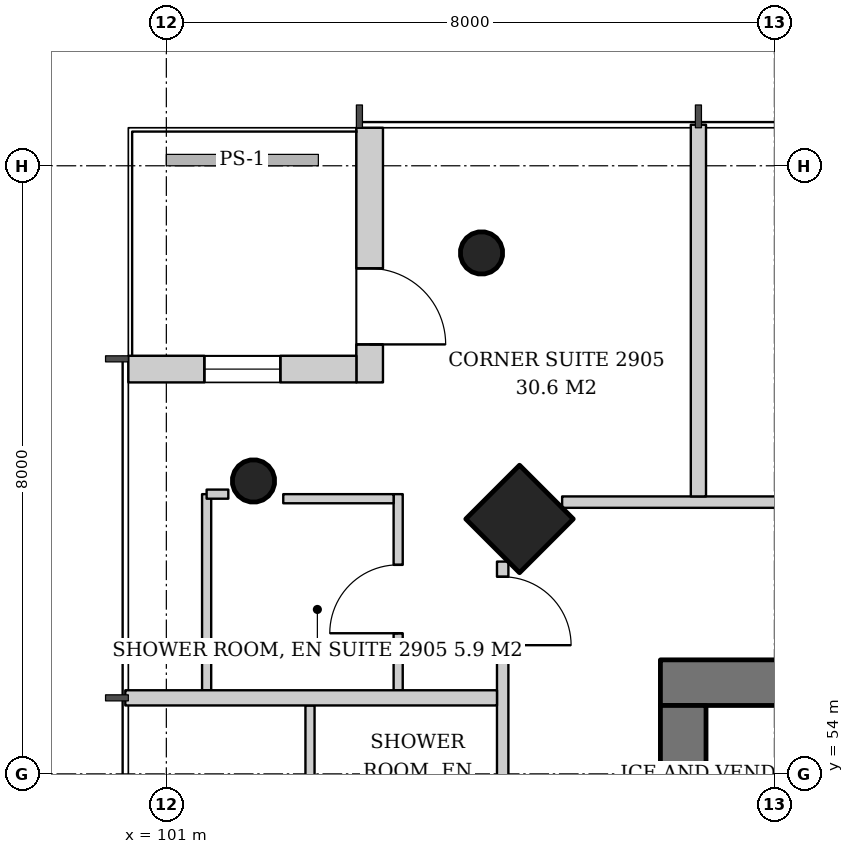
"""IFC4 building model, lengths in metres.
Left out: names, types, materials, properties, quantities, classifications, styles, units other than length and angle.
Written with IfcOpenShell. Run it as: python <this file> out.ifc"""

import sys

from ifc_helpers import new_model, si_unit, direction, frame, frame_2d, origin, origin_2d, place, context, subcontext, project, spatial, rectangle, hollow_circle, extrude, element, fill, save


model = new_model("IFC4")
c1 = context("Model", 3, precision=1e-05, world=origin(), true_north=direction((0.0, 1.0)))
c2 = subcontext(c1, "Body", "Model", "MODEL_VIEW")
j1 = project(units=[si_unit("LENGTHUNIT", "METRE"), si_unit("PLANEANGLEUNIT", "RADIAN")], contexts=[c1])
p1 = place(None, origin())
s1 = spatial("IfcSite", under=j1, at=p1, CompositionType="ELEMENT")
p2 = place(p1, origin())
s2 = spatial("IfcBuilding", under=s1, at=p2, CompositionType="ELEMENT")
p3 = place(p2, frame((0.0, 0.0, 116.0)))
s3 = spatial("IfcBuildingStorey", under=s2, at=p3, CompositionType="ELEMENT", Elevation=116.0)
p4 = place(p3, frame((105.595, 57.405, 0.0), z_axis=(0.043029647111, -0.043029647111, 0.998146732169), x_axis=(0.707106781187, 0.707106781187, 0.0)))
e1 = element("IfcColumn", 1, at=p4, inside=s3, PredefinedType="COLUMN", context=c2, shape_type="SweptSolid", body=[
    extrude(rectangle(XDim=1.0, YDim=1.0, at=origin_2d()), origin(), (0.0, 0.0, 1.0), 3.807),
])
for number, where, z_axis, x_axis in (
    (2, (105.095, 60.905, 0.0), (0.043, -0.043, 0.998), (0.707, 0.707, 0.0)),
    (3, (102.095, 57.905, 0.0), (0.043, -0.043, 0.998), (0.707, 0.707, 0.0)),
):
    element("IfcColumn", number, at=place(p3, frame(where, z_axis=z_axis, x_axis=x_axis)), inside=s3, PredefinedType="COLUMN", context=c2, shape_type="SweptSolid", body=[
        extrude(hollow_circle(Radius=0.28, WallThickness=0.02, at=origin_2d()), origin(), (0.0, 0.0, 1.0), 3.807),
    ])
p5 = place(p3, frame((107.5, 55.2, 0.0), z_axis=(0.0, 0.0, 1.0), x_axis=(1.0, 0.0, 0.0)))
e4 = element("IfcWall", 4, at=p5, inside=s3, PredefinedType="SHEAR", context=c2, shape_type="SweptSolid", body=[
    extrude(rectangle(XDim=19.0, YDim=0.6, at=frame_2d((9.5, 0.0))), origin(), (0.0, 0.0, 1.0), 3.8),
])
p6 = place(p5, frame((14.14, 0.0, 0.0)))
e5 = element("IfcOpeningElement", 5, at=p6, cuts=e4, PredefinedType="OPENING", context=c2, shape_type="SweptSolid", body=[
    extrude(rectangle(XDim=1.0, YDim=2.1, at=frame_2d((0.5, 1.05))), frame((0.0, 0.31, 0.0), z_axis=(0.0, -1.0, 0.0), x_axis=(1.0, 0.0, 0.0)), (0.0, 0.0, 1.0), 0.62),
])
p7 = place(p5, frame((1.675, 0.0, 0.0)))
e6 = element("IfcOpeningElement", 6, at=p7, cuts=e4, PredefinedType="OPENING", context=c2, shape_type="SweptSolid", body=[
    extrude(rectangle(XDim=1.0, YDim=2.1, at=frame_2d((0.5, 1.05))), frame((0.0, 0.31, 0.0), z_axis=(0.0, -1.0, 0.0), x_axis=(1.0, 0.0, 0.0)), (0.0, 0.0, 1.0), 0.62),
])
p8 = place(p5, frame((3.587, 0.0, 0.0)))
e7 = element("IfcOpeningElement", 7, at=p8, cuts=e4, PredefinedType="OPENING", context=c2, shape_type="SweptSolid", body=[
    extrude(rectangle(XDim=1.0, YDim=2.1, at=frame_2d((0.5, 1.05))), frame((0.0, 0.31, 0.0), z_axis=(0.0, -1.0, 0.0), x_axis=(1.0, 0.0, 0.0)), (0.0, 0.0, 1.0), 0.62),
])
p9 = place(p3, frame((107.8, 37.1, 0.0), z_axis=(0.0, 0.0, 1.0), x_axis=(0.0, 1.0, 0.0)))
e8 = element("IfcWall", 8, at=p9, inside=s3, PredefinedType="SHEAR", context=c2, shape_type="SweptSolid", body=[
    extrude(rectangle(XDim=17.8, YDim=0.6, at=frame_2d((8.9, 0.0))), origin(), (0.0, 0.0, 1.0), 3.8),
])
p10 = place(p9, frame((8.0, 0.0, 0.0)))
e9 = element("IfcOpeningElement", 9, at=p10, cuts=e8, PredefinedType="OPENING", context=c2, shape_type="SweptSolid", body=[
    extrude(rectangle(XDim=1.8, YDim=2.4, at=frame_2d((0.9, 1.2))), frame((0.0, 0.31, 0.0), z_axis=(0.0, -1.0, 0.0), x_axis=(1.0, 0.0, 0.0)), (0.0, 0.0, 1.0), 0.62),
])
p11 = place(p3, frame((103.675, 62.5, 0.0), z_axis=(0.0, 0.0, 1.0), x_axis=(0.0, -1.0, 0.0)))
e10 = element("IfcWall", 10, at=p11, inside=s3, PredefinedType="SOLIDWALL", context=c2, shape_type="SweptSolid", body=[
    extrude(rectangle(XDim=3.35, YDim=0.35, at=frame_2d((1.675, 0.0))), origin(), (0.0, 0.0, 1.0), 3.6),
])
p12 = place(p11, frame((1.85, 0.0, 0.0)))
e11 = element("IfcOpeningElement", 11, at=p12, cuts=e10, PredefinedType="OPENING", context=c2, shape_type="SweptSolid", body=[
    extrude(rectangle(XDim=1.0, YDim=2.4, at=frame_2d((0.5, 1.2))), frame((0.0, 0.185, 0.0), z_axis=(0.0, -1.0, 0.0), x_axis=(1.0, 0.0, 0.0)), (0.0, 0.0, 1.0), 0.37),
])
p13 = place(p3, frame((103.5, 59.325, 0.0), z_axis=(0.0, 0.0, 1.0), x_axis=(-1.0, 0.0, 0.0)))
e12 = element("IfcWall", 12, at=p13, inside=s3, PredefinedType="SOLIDWALL", context=c2, shape_type="SweptSolid", body=[
    extrude(rectangle(XDim=3.0, YDim=0.35, at=frame_2d((1.5, 0.0))), origin(), (0.0, 0.0, 1.0), 3.6),
])
p14 = place(p13, frame((1.0, 0.0, 0.9)))
e13 = element("IfcOpeningElement", 13, at=p14, cuts=e12, PredefinedType="OPENING", context=c2, shape_type="SweptSolid", body=[
    extrude(rectangle(XDim=1.0, YDim=2.4, at=frame_2d((0.5, 1.2))), frame((0.0, 0.185, 0.0), z_axis=(0.0, -1.0, 0.0), x_axis=(1.0, 0.0, 0.0)), (0.0, 0.0, 1.0), 0.37),
])
p15 = place(p3, frame((127.793, 57.575, 0.0), z_axis=(0.0, 0.0, 1.0), x_axis=(-1.0, 0.0, 0.0)))
e14 = element("IfcWall", 14, at=p15, inside=s3, PredefinedType="PARTITIONING", context=c2, shape_type="SweptSolid", body=[
    extrude(rectangle(XDim=21.586, YDim=0.15, at=frame_2d((10.793, 0.0))), origin(), (0.0, 0.0, 1.0), 2.9),
])
p16 = place(p15, frame((0.2, 0.0, 0.0)))
e15 = element("IfcOpeningElement", 15, at=p16, cuts=e14, PredefinedType="OPENING", context=c2, shape_type="SweptSolid", body=[
    extrude(rectangle(XDim=0.9, YDim=2.1, at=frame_2d((0.45, 1.05))), frame((0.0, 0.085, 0.0), z_axis=(0.0, -1.0, 0.0), x_axis=(1.0, 0.0, 0.0)), (0.0, 0.0, 1.0), 0.17),
])
p17 = place(p15, frame((4.543, 0.0, 0.0)))
e16 = element("IfcOpeningElement", 16, at=p17, cuts=e14, PredefinedType="OPENING", context=c2, shape_type="SweptSolid", body=[
    extrude(rectangle(XDim=0.9, YDim=2.1, at=frame_2d((0.45, 1.05))), frame((0.0, 0.085, 0.0), z_axis=(0.0, -1.0, 0.0), x_axis=(1.0, 0.0, 0.0)), (0.0, 0.0, 1.0), 0.17),
])
p18 = place(p15, frame((13.493, 0.0, 0.0)))
e17 = element("IfcOpeningElement", 17, at=p18, cuts=e14, PredefinedType="OPENING", context=c2, shape_type="SweptSolid", body=[
    extrude(rectangle(XDim=1.0, YDim=2.1, at=frame_2d((0.5, 1.05))), frame((0.0, 0.085, 0.0), z_axis=(0.0, -1.0, 0.0), x_axis=(1.0, 0.0, 0.0)), (0.0, 0.0, 1.0), 0.17),
])
p19 = place(p3, frame((108.0, 57.65, 0.0), z_axis=(0.0, 0.0, 1.0), x_axis=(0.0, 1.0, 0.0)))
e18 = element("IfcWall", 18, at=p19, inside=s3, PredefinedType="PARTITIONING", context=c2, shape_type="SweptSolid", body=[
    extrude(rectangle(XDim=4.89, YDim=0.2, at=frame_2d((2.445, 0.0))), origin(), (0.0, 0.0, 1.0), 3.2),
])
p20 = place(p3, frame((104.05, 55.1, 0.0), z_axis=(0.0, 0.0, 1.0), x_axis=(0.0, 1.0, 0.0)))
e19 = element("IfcWall", 19, at=p20, inside=s3, PredefinedType="PARTITIONING", context=c2, shape_type="SweptSolid", body=[
    extrude(rectangle(XDim=2.58, YDim=0.12, at=frame_2d((1.29, 0.0))), origin(), (0.0, 0.0, 1.0), 2.9),
])
p21 = place(p20, frame((0.75, 0.0, 0.0)))
e20 = element("IfcOpeningElement", 20, at=p21, cuts=e19, PredefinedType="OPENING", context=c2, shape_type="SweptSolid", body=[
    extrude(rectangle(XDim=0.9, YDim=2.1, at=frame_2d((0.45, 1.05))), frame((0.0, 0.07, 0.0), z_axis=(0.0, -1.0, 0.0), x_axis=(1.0, 0.0, 0.0)), (0.0, 0.0, 1.0), 0.14),
])
p22 = place(p3, frame((101.53, 55.1, 0.0), z_axis=(0.0, 0.0, 1.0), x_axis=(0.0, 1.0, 0.0)))
e21 = element("IfcWall", 21, at=p22, inside=s3, PredefinedType="PARTITIONING", context=c2, shape_type="SweptSolid", body=[
    extrude(rectangle(XDim=2.58, YDim=0.12, at=frame_2d((1.29, 0.0))), origin(), (0.0, 0.0, 1.0), 3.6),
])
p23 = place(p3, frame((103.99, 57.62, 0.0), z_axis=(0.0, 0.0, 1.0), x_axis=(-1.0, 0.0, 0.0)))
e22 = element("IfcWall", 22, at=p23, inside=s3, PredefinedType="PARTITIONING", context=c2, shape_type="SweptSolid", body=[
    extrude(rectangle(XDim=1.452, YDim=0.12, at=frame_2d((0.726, 0.0))), origin(), (0.0, 0.0, 1.0), 3.2),
])
p24 = place(p3, frame((102.89, 54.9, 0.0), z_axis=(0.0, 0.0, 1.0), x_axis=(0.0, -1.0, 0.0)))
e23 = element("IfcWall", 23, at=p24, inside=s3, PredefinedType="PARTITIONING", context=c2, shape_type="SweptSolid", body=[
    extrude(rectangle(XDim=2.42, YDim=0.12, at=frame_2d((1.21, 0.0))), origin(), (0.0, 0.0, 1.0), 3.6),
])
p25 = place(p3, frame((105.425, 56.793, 0.0), z_axis=(0.0, 0.0, 1.0), x_axis=(0.0, -1.0, 0.0)))
e24 = element("IfcWall", 24, at=p25, inside=s3, PredefinedType="PARTITIONING", context=c2, shape_type="SweptSolid", body=[
    extrude(rectangle(XDim=21.586, YDim=0.15, at=frame_2d((10.793, 0.0))), origin(), (0.0, 0.0, 1.0), 2.9),
])
p26 = place(p25, frame((0.2, 0.0, 0.0)))
e25 = element("IfcOpeningElement", 25, at=p26, cuts=e24, PredefinedType="OPENING", context=c2, shape_type="SweptSolid", body=[
    extrude(rectangle(XDim=0.9, YDim=2.1, at=frame_2d((0.45, 1.05))), frame((0.0, 0.085, 0.0), z_axis=(0.0, -1.0, 0.0), x_axis=(1.0, 0.0, 0.0)), (0.0, 0.0, 1.0), 0.17),
])
p27 = place(p25, frame((4.543, 0.0, 0.0)))
e26 = element("IfcOpeningElement", 26, at=p27, cuts=e24, PredefinedType="OPENING", context=c2, shape_type="SweptSolid", body=[
    extrude(rectangle(XDim=0.9, YDim=2.1, at=frame_2d((0.45, 1.05))), frame((0.0, 0.085, 0.0), z_axis=(0.0, -1.0, 0.0), x_axis=(1.0, 0.0, 0.0)), (0.0, 0.0, 1.0), 0.17),
])
p28 = place(p25, frame((13.543, 0.0, 0.0)))
e27 = element("IfcOpeningElement", 27, at=p28, cuts=e24, PredefinedType="OPENING", context=c2, shape_type="SweptSolid", body=[
    extrude(rectangle(XDim=0.9, YDim=2.1, at=frame_2d((0.45, 1.05))), frame((0.0, 0.085, 0.0), z_axis=(0.0, -1.0, 0.0), x_axis=(1.0, 0.0, 0.0)), (0.0, 0.0, 1.0), 0.17),
])
p29 = place(p3, frame((105.35, 55.0, 0.0), z_axis=(0.0, 0.0, 1.0), x_axis=(-1.0, 0.0, 0.0)))
e28 = element("IfcWall", 28, at=p29, inside=s3, PredefinedType="PARTITIONING", context=c2, shape_type="SweptSolid", body=[
    extrude(rectangle(XDim=4.89, YDim=0.2, at=frame_2d((2.445, 0.0))), origin(), (0.0, 0.0, 1.0), 2.9),
])
p30 = place(p3, frame((101.53, 57.68, 0.0), z_axis=(0.0, 0.0, 1.0), x_axis=(1.0, 0.0, 0.0)))
e29 = element("IfcWall", 29, at=p30, inside=s3, PredefinedType="PARTITIONING", context=c2, shape_type="SweptSolid", body=[
    extrude(rectangle(XDim=0.285, YDim=0.12, at=frame_2d((0.143, 0.0))), origin(), (0.0, 0.0, 1.0), 3.6),
])
p31 = place(p12, origin())
e30 = element("IfcDoor", 30, at=p31, inside=s3, OperationType="SINGLE_SWING_RIGHT", PredefinedType="DOOR", context=c2, shape_type="SweptSolid", body=[
    extrude(rectangle(XDim=1.0, YDim=2.4, at=frame_2d((0.5, 1.2))), frame((0.0, 0.025, 0.0), z_axis=(0.0, -1.0, 0.0), x_axis=(1.0, 0.0, 0.0)), (0.0, 0.0, 1.0), 0.05),
])
fill(e11, e30)
p32 = place(p14, origin())
e31 = element("IfcWindow", 31, at=p32, inside=s3, PartitioningType="SINGLE_PANEL", PredefinedType="WINDOW", context=c2, shape_type="SweptSolid", body=[
    extrude(rectangle(XDim=1.0, YDim=2.4, at=frame_2d((0.5, 1.2))), frame((0.0, 0.03, 0.0), z_axis=(0.0, -1.0, 0.0), x_axis=(1.0, 0.0, 0.0)), (0.0, 0.0, 1.0), 0.06),
])
fill(e13, e31)
p33 = place(p21, origin())
e32 = element("IfcDoor", 32, at=p33, inside=s3, OperationType="SINGLE_SWING_LEFT", PredefinedType="DOOR", context=c2, shape_type="SweptSolid", body=[
    extrude(rectangle(XDim=0.9, YDim=2.1, at=frame_2d((0.45, 1.05))), frame((0.0, 0.025, 0.0), z_axis=(0.0, -1.0, 0.0), x_axis=(1.0, 0.0, 0.0)), (0.0, 0.0, 1.0), 0.05),
])
fill(e20, e32)
p34 = place(p26, origin())
e33 = element("IfcDoor", 33, at=p34, inside=s3, OperationType="SINGLE_SWING_RIGHT", PredefinedType="DOOR", context=c2, shape_type="SweptSolid", body=[
    extrude(rectangle(XDim=0.9, YDim=2.1, at=frame_2d((0.45, 1.05))), frame((0.0, 0.025, 0.0), z_axis=(0.0, -1.0, 0.0), x_axis=(1.0, 0.0, 0.0)), (0.0, 0.0, 1.0), 0.05),
])
fill(e25, e33)
save(model, sys.argv[1])
